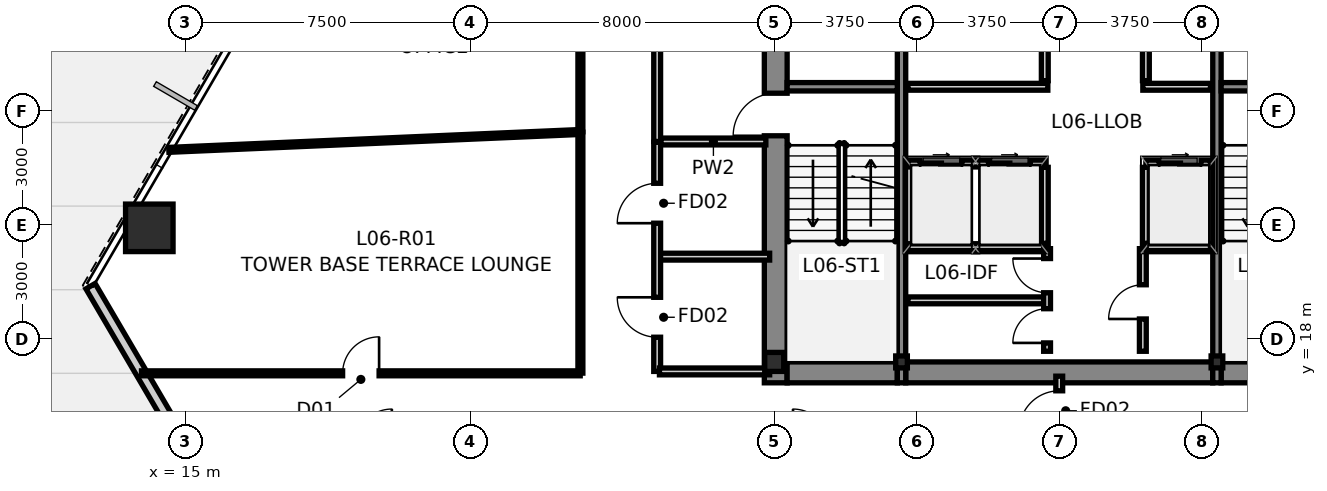
"""IFC4 building model, lengths in metres.
Left out: names, types, materials, properties, quantities, classifications, styles, units other than length and angle.
Written with IfcOpenShell. Run it as: python <this file> out.ifc"""

import sys

from ifc_helpers import new_model, si_unit, direction, frame, frame_2d, origin, origin_2d, place, context, subcontext, project, spatial, rectangle, hollow_rectangle, i_section, extrude, source, transform, mapped, element, fill, save


model = new_model("IFC4")
c1 = context("Model", 3, precision=1e-05, world=origin(), true_north=direction((0.0, 1.0)))
c2 = subcontext(c1, "Body", "Model", "MODEL_VIEW")
j1 = project(units=[si_unit("LENGTHUNIT", "METRE"), si_unit("PLANEANGLEUNIT", "RADIAN")], contexts=[c1])
p1 = place(None, origin())
s1 = spatial("IfcSite", under=j1, at=p1, CompositionType="ELEMENT")
p2 = place(p1, origin())
s2 = spatial("IfcBuilding", under=s1, at=p2, CompositionType="ELEMENT")
p3 = place(p2, frame((0.0, 0.0, 27.6)))
s3 = spatial("IfcBuildingStorey", under=s2, at=p3, CompositionType="ELEMENT", Elevation=27.6)
m1 = source(origin(), c2, "Body", "SweptSolid", [
    extrude(i_section(OverallWidth=0.5, OverallDepth=0.5, WebThickness=0.028, FlangeThickness=0.04, at=origin_2d()), origin(), (0.0, 0.0, 1.0), 3.65),
])
p4 = place(p3, frame((30.5, 17.4, 0.0), z_axis=(0.0, 0.0, 1.0), x_axis=(1.0, 0.0, 0.0)))
e1 = element("IfcColumn", 1, at=p4, inside=s3, PredefinedType="COLUMN", context=c2, shape_type="MappedRepresentation", body=[
    mapped(m1, transform((0.0, 0.0, 0.0), scale=1.0)),
])
m2 = source(origin(), c2, "Body", "SweptSolid", [
    extrude(i_section(OverallWidth=0.307, OverallDepth=0.315, WebThickness=0.012, FlangeThickness=0.019, at=origin_2d()), origin(), (0.0, 0.0, 1.0), 3.65),
])
for number, where, z_axis, x_axis in (
    (2, (33.85, 17.4, 0.0), (0.0, 0.0, 1.0), (1.0, 0.0, 0.0)),
    (3, (42.15, 17.4, 0.0), (0.0, 0.0, 1.0), (1.0, 0.0, 0.0)),
):
    element("IfcColumn", number, at=place(p3, frame(where, z_axis=z_axis, x_axis=x_axis)), inside=s3, PredefinedType="COLUMN", context=c2, shape_type="MappedRepresentation", body=[
        mapped(m2, transform((0.0, 0.0, 0.0), scale=1.0)),
    ])
p5 = place(p3, frame((30.54, 16.85, 0.0), z_axis=(0.0, 0.0, 1.0), x_axis=(0.0, 1.0, 0.0)))
e4 = element("IfcWall", 4, at=p5, inside=s3, PredefinedType="SHEAR", context=c2, shape_type="SweptSolid", body=[
    extrude(rectangle(XDim=13.425, YDim=0.6, at=frame_2d((6.712, 0.0))), origin(), (0.0, 0.0, 1.0), 3.65),
])
p6 = place(p5, frame((6.5, 0.0, 0.0)))
e5 = element("IfcOpeningElement", 5, at=p6, cuts=e4, PredefinedType="OPENING", context=c2, shape_type="SweptSolid", body=[
    extrude(rectangle(XDim=1.12, YDim=2.15, at=frame_2d((0.56, 1.075))), frame((0.0, 0.312, 0.0), z_axis=(0.0, -1.0, 0.0), x_axis=(1.0, 0.0, 0.0)), (0.0, 0.0, 1.0), 0.624),
])
p7 = place(p5, frame((10.95, 0.0, 0.0)))
e6 = element("IfcOpeningElement", 6, at=p7, cuts=e4, PredefinedType="OPENING", context=c2, shape_type="SweptSolid", body=[
    extrude(rectangle(XDim=1.2, YDim=2.2, at=frame_2d((0.6, 1.1))), frame((0.0, 0.312, 0.0), z_axis=(0.0, -1.0, 0.0), x_axis=(1.0, 0.0, 0.0)), (0.0, 0.0, 1.0), 0.624),
])
p8 = place(p3, frame((30.84, 17.125, 0.0), z_axis=(0.0, 0.0, 1.0), x_axis=(1.0, 0.0, 0.0)))
e7 = element("IfcWall", 7, at=p8, inside=s3, PredefinedType="SHEAR", context=c2, shape_type="SweptSolid", body=[
    extrude(rectangle(XDim=2.9, YDim=0.55, at=frame_2d((1.45, 0.0))), origin(), (0.0, 0.0, 1.0), 3.65),
])
p9 = place(p3, frame((33.96, 17.125, 0.0), z_axis=(0.0, 0.0, 1.0), x_axis=(1.0, 0.0, 0.0)))
e8 = element("IfcWall", 8, at=p9, inside=s3, PredefinedType="SHEAR", context=c2, shape_type="SweptSolid", body=[
    extrude(rectangle(XDim=8.08, YDim=0.55, at=frame_2d((4.04, 0.0))), origin(), (0.0, 0.0, 1.0), 3.65),
])
p10 = place(p3, frame((42.26, 17.125, 0.0), z_axis=(0.0, 0.0, 1.0), x_axis=(1.0, 0.0, 0.0)))
e9 = element("IfcWall", 9, at=p10, inside=s3, PredefinedType="SHEAR", context=c2, shape_type="SweptSolid", body=[
    extrude(rectangle(XDim=2.9, YDim=0.55, at=frame_2d((1.45, 0.0))), origin(), (0.0, 0.0, 1.0), 3.65),
])
for number, where, z_axis, x_axis in (
    (10, (33.85, 16.85, 0.0), (0.0, 0.0, 1.0), (0.0, 1.0, 0.0)),
    (11, (42.15, 16.85, 0.0), (0.0, 0.0, 1.0), (0.0, 1.0, 0.0)),
):
    element("IfcWall", number, at=place(p3, frame(where, z_axis=z_axis, x_axis=x_axis)), inside=s3, PredefinedType="SHEAR", context=c2, shape_type="SweptSolid", body=[
        extrude(rectangle(XDim=13.425, YDim=0.22, at=frame_2d((6.712, 0.0))), origin(), (0.0, 0.0, 1.0), 3.65),
    ])
for number, where, z_axis, x_axis in (
    (12, (30.84, 24.64, 0.0), (0.0, 0.0, 1.0), (1.0, 0.0, 0.0)),
    (13, (42.26, 24.64, 0.0), (0.0, 0.0, 1.0), (1.0, 0.0, 0.0)),
):
    element("IfcWall", number, at=place(p3, frame(where, z_axis=z_axis, x_axis=x_axis)), inside=s3, PredefinedType="SHEAR", context=c2, shape_type="SweptSolid", body=[
        extrude(rectangle(XDim=2.9, YDim=0.22, at=frame_2d((1.45, 0.0))), origin(), (0.0, 0.0, 1.0), 3.65),
    ])
m3 = source(origin(), c2, "Body", "SweptSolid", [
    extrude(hollow_rectangle(XDim=1.25, YDim=1.25, WallThickness=0.07, at=origin_2d()), origin(), (0.0, 0.0, 1.0), 3.651),
])
p11 = place(p3, frame((14.056, 20.928, 0.0), z_axis=(0.010431795422, -0.021532295679, 0.999713727968), x_axis=(0.899947055326, 0.435999194506, 0.0)))
e14 = element("IfcColumn", 14, at=p11, inside=s3, PredefinedType="COLUMN", context=c2, shape_type="MappedRepresentation", body=[
    mapped(m3, transform((0.0, 0.0, 0.0), scale=1.0)),
])
p12 = place(p3, frame((21.466, 4.107, 0.0), z_axis=(0.0, 0.0, 1.0), x_axis=(-0.505539127034, 0.862803680473, 0.0)))
e15 = element("IfcWall", 15, at=p12, inside=s3, PredefinedType="STANDARD", context=c2, shape_type="SweptSolid", body=[
    extrude(rectangle(XDim=17.717, YDim=0.28, at=frame_2d((8.858, 0.0))), origin(), (0.0, 0.0, 1.0), 3.4),
])
p13 = place(p12, frame((7.96, 0.0, 0.9)))
e16 = element("IfcOpeningElement", 16, at=p13, cuts=e15, PredefinedType="OPENING", context=c2, shape_type="SweptSolid", body=[
    extrude(rectangle(XDim=1.8, YDim=1.8, at=frame_2d((0.9, 0.9))), frame((0.0, 0.152, 0.0), z_axis=(0.0, -1.0, 0.0), x_axis=(1.0, 0.0, 0.0)), (0.0, 0.0, 1.0), 0.304),
])
p14 = place(p3, frame((34.02, 22.62, 0.0), z_axis=(0.0, 0.0, 1.0), x_axis=(1.0, 0.0, 0.0)))
e17 = element("IfcWall", 17, at=p14, inside=s3, PredefinedType="PARTITIONING", context=c2, shape_type="SweptSolid", body=[
    extrude(rectangle(XDim=3.6, YDim=0.18, at=frame_2d((1.8, 0.0))), origin(), (0.0, 0.0, 1.0), 3.4),
])
p15 = place(p14, frame((0.32, 0.0, 0.0)))
e18 = element("IfcOpeningElement", 18, at=p15, cuts=e17, PredefinedType="OPENING", context=c2, shape_type="SweptSolid", body=[
    extrude(rectangle(XDim=1.1, YDim=2.2, at=frame_2d((0.55, 1.1))), frame((0.0, 0.102, 0.0), z_axis=(0.0, -1.0, 0.0), x_axis=(1.0, 0.0, 0.0)), (0.0, 0.0, 1.0), 0.204),
])
p16 = place(p14, frame((2.12, 0.0, 0.0)))
e19 = element("IfcOpeningElement", 19, at=p16, cuts=e17, PredefinedType="OPENING", context=c2, shape_type="SweptSolid", body=[
    extrude(rectangle(XDim=1.1, YDim=2.2, at=frame_2d((0.55, 1.1))), frame((0.0, 0.102, 0.0), z_axis=(0.0, -1.0, 0.0), x_axis=(1.0, 0.0, 0.0)), (0.0, 0.0, 1.0), 0.204),
])
p17 = place(p3, frame((40.28, 22.62, 0.0), z_axis=(0.0, 0.0, 1.0), x_axis=(1.0, 0.0, 0.0)))
e20 = element("IfcWall", 20, at=p17, inside=s3, PredefinedType="PARTITIONING", context=c2, shape_type="SweptSolid", body=[
    extrude(rectangle(XDim=1.7, YDim=0.18, at=frame_2d((0.85, 0.0))), origin(), (0.0, 0.0, 1.0), 3.4),
])
p18 = place(p17, frame((0.35, 0.0, 0.0)))
e21 = element("IfcOpeningElement", 21, at=p18, cuts=e20, PredefinedType="OPENING", context=c2, shape_type="SweptSolid", body=[
    extrude(rectangle(XDim=1.1, YDim=2.2, at=frame_2d((0.55, 1.1))), frame((0.0, 0.102, 0.0), z_axis=(0.0, -1.0, 0.0), x_axis=(1.0, 0.0, 0.0)), (0.0, 0.0, 1.0), 0.204),
])
for number, where, z_axis, x_axis in (
    (22, (37.62, 20.52, 0.0), (0.0, 0.0, 1.0), (0.0, 1.0, 0.0)),
    (23, (40.28, 20.52, 0.0), (0.0, 0.0, 1.0), (0.0, 1.0, 0.0)),
    (24, (37.62, 24.8, 0.0), (0.0, 0.0, 1.0), (0.0, 1.0, 0.0)),
    (25, (40.28, 24.8, 0.0), (0.0, 0.0, 1.0), (0.0, 1.0, 0.0)),
):
    element("IfcWall", number, at=place(p3, frame(where, z_axis=z_axis, x_axis=x_axis)), inside=s3, PredefinedType="PARTITIONING", context=c2, shape_type="SweptSolid", body=[
        extrude(rectangle(XDim=2.0, YDim=0.18, at=frame_2d((1.0, 0.0))), origin(), (0.0, 0.0, 1.0), 3.4),
    ])
p19 = place(p3, frame((34.02, 24.64, 0.0), z_axis=(0.0, 0.0, 1.0), x_axis=(1.0, 0.0, 0.0)))
e26 = element("IfcWall", 26, at=p19, inside=s3, PredefinedType="PARTITIONING", context=c2, shape_type="SweptSolid", body=[
    extrude(rectangle(XDim=3.68, YDim=0.18, at=frame_2d((1.84, 0.0))), origin(), (0.0, 0.0, 1.0), 3.4),
])
p20 = place(p3, frame((40.2, 24.64, 0.0), z_axis=(0.0, 0.0, 1.0), x_axis=(1.0, 0.0, 0.0)))
e27 = element("IfcWall", 27, at=p20, inside=s3, PredefinedType="PARTITIONING", context=c2, shape_type="SweptSolid", body=[
    extrude(rectangle(XDim=1.78, YDim=0.18, at=frame_2d((0.89, 0.0))), origin(), (0.0, 0.0, 1.0), 3.4),
])
p21 = place(p3, frame((27.42, 23.2, 0.0), z_axis=(0.0, 0.0, 1.0), x_axis=(0.0, 1.0, 0.0)))
e28 = element("IfcWall", 28, at=p21, inside=s3, PredefinedType="PARTITIONING", context=c2, shape_type="SweptSolid", body=[
    extrude(rectangle(XDim=6.4, YDim=0.18, at=frame_2d((3.2, 0.0))), origin(), (0.0, 0.0, 1.0), 3.4),
])
p22 = place(p21, frame((2.65, 0.0, 0.0)))
e29 = element("IfcOpeningElement", 29, at=p22, cuts=e28, PredefinedType="OPENING", context=c2, shape_type="SweptSolid", body=[
    extrude(rectangle(XDim=1.05, YDim=2.15, at=frame_2d((0.525, 1.075))), frame((0.0, 0.102, 0.0), z_axis=(0.0, -1.0, 0.0), x_axis=(1.0, 0.0, 0.0)), (0.0, 0.0, 1.0), 0.204),
])
p23 = place(p3, frame((27.52, 23.2, 0.0), z_axis=(0.0, 0.0, 1.0), x_axis=(1.0, 0.0, 0.0)))
e30 = element("IfcWall", 30, at=p23, inside=s3, PredefinedType="PARTITIONING", context=c2, shape_type="SweptSolid", body=[
    extrude(rectangle(XDim=2.76, YDim=0.18, at=frame_2d((1.38, 0.0))), origin(), (0.0, 0.0, 1.0), 3.4),
])
p24 = place(p3, frame((34.02, 20.42, 0.0), z_axis=(0.0, 0.0, 1.0), x_axis=(1.0, 0.0, 0.0)))
e31 = element("IfcWall", 31, at=p24, inside=s3, PredefinedType="PARTITIONING", context=c2, shape_type="SweptSolid", body=[
    extrude(rectangle(XDim=3.64, YDim=0.18, at=frame_2d((1.82, 0.0))), origin(), (0.0, 0.0, 1.0), 3.4),
])
p25 = place(p3, frame((40.22, 20.42, 0.0), z_axis=(0.0, 0.0, 1.0), x_axis=(1.0, 0.0, 0.0)))
e32 = element("IfcWall", 32, at=p25, inside=s3, PredefinedType="PARTITIONING", context=c2, shape_type="SweptSolid", body=[
    extrude(rectangle(XDim=1.76, YDim=0.18, at=frame_2d((0.88, 0.0))), origin(), (0.0, 0.0, 1.0), 3.4),
])
p26 = place(p3, frame((34.02, 19.02, 0.0), z_axis=(0.0, 0.0, 1.0), x_axis=(1.0, 0.0, 0.0)))
e33 = element("IfcWall", 33, at=p26, inside=s3, PredefinedType="PARTITIONING", context=c2, shape_type="SweptSolid", body=[
    extrude(rectangle(XDim=3.58, YDim=0.18, at=frame_2d((1.79, 0.0))), origin(), (0.0, 0.0, 1.0), 3.4),
])
p27 = place(p3, frame((37.68, 17.68, 0.0), z_axis=(0.0, 0.0, 1.0), x_axis=(0.0, 1.0, 0.0)))
e34 = element("IfcWall", 34, at=p27, inside=s3, PredefinedType="PARTITIONING", context=c2, shape_type="SweptSolid", body=[
    extrude(rectangle(XDim=2.7, YDim=0.18, at=frame_2d((1.35, 0.0))), origin(), (0.0, 0.0, 1.0), 3.4),
])
p28 = place(p27, frame((0.22, 0.0, 0.0)))
e35 = element("IfcOpeningElement", 35, at=p28, cuts=e34, PredefinedType="OPENING", context=c2, shape_type="SweptSolid", body=[
    extrude(rectangle(XDim=0.9, YDim=2.1, at=frame_2d((0.45, 1.05))), frame((0.0, 0.102, 0.0), z_axis=(0.0, -1.0, 0.0), x_axis=(1.0, 0.0, 0.0)), (0.0, 0.0, 1.0), 0.204),
])
p29 = place(p27, frame((1.54, 0.0, 0.0)))
e36 = element("IfcOpeningElement", 36, at=p29, cuts=e34, PredefinedType="OPENING", context=c2, shape_type="SweptSolid", body=[
    extrude(rectangle(XDim=0.9, YDim=2.1, at=frame_2d((0.45, 1.05))), frame((0.0, 0.102, 0.0), z_axis=(0.0, -1.0, 0.0), x_axis=(1.0, 0.0, 0.0)), (0.0, 0.0, 1.0), 0.204),
])
p30 = place(p3, frame((40.2, 17.68, 0.0), z_axis=(0.0, 0.0, 1.0), x_axis=(0.0, 1.0, 0.0)))
e37 = element("IfcWall", 37, at=p30, inside=s3, PredefinedType="PARTITIONING", context=c2, shape_type="SweptSolid", body=[
    extrude(rectangle(XDim=2.7, YDim=0.18, at=frame_2d((1.35, 0.0))), origin(), (0.0, 0.0, 1.0), 3.4),
])
p31 = place(p30, frame((0.85, 0.0, 0.0)))
e38 = element("IfcOpeningElement", 38, at=p31, cuts=e37, PredefinedType="OPENING", context=c2, shape_type="SweptSolid", body=[
    extrude(rectangle(XDim=0.9, YDim=2.1, at=frame_2d((0.45, 1.05))), frame((0.0, 0.102, 0.0), z_axis=(0.0, -1.0, 0.0), x_axis=(1.0, 0.0, 0.0)), (0.0, 0.0, 1.0), 0.204),
])
p32 = place(p3, frame((27.48, 20.17, 0.0), z_axis=(0.0, 0.0, 1.0), x_axis=(1.0, 0.0, 0.0)))
e39 = element("IfcWall", 39, at=p32, inside=s3, PredefinedType="PARTITIONING", context=c2, shape_type="SweptSolid", body=[
    extrude(rectangle(XDim=2.9, YDim=0.18, at=frame_2d((1.45, 0.0))), origin(), (0.0, 0.0, 1.0), 3.4),
])
p33 = place(p3, frame((27.42, 17.15, 0.0), z_axis=(0.0, 0.0, 1.0), x_axis=(0.0, 1.0, 0.0)))
e40 = element("IfcWall", 40, at=p33, inside=s3, PredefinedType="PARTITIONING", context=c2, shape_type="SweptSolid", body=[
    extrude(rectangle(XDim=6.03, YDim=0.18, at=frame_2d((3.015, 0.0))), origin(), (0.0, 0.0, 1.0), 3.026),
])
p34 = place(p33, frame((0.9, 0.0, 0.0)))
e41 = element("IfcOpeningElement", 41, at=p34, cuts=e40, PredefinedType="OPENING", context=c2, shape_type="SweptSolid", body=[
    extrude(rectangle(XDim=1.05, YDim=2.15, at=frame_2d((0.525, 1.075))), frame((0.0, 0.102, 0.0), z_axis=(0.0, -1.0, 0.0), x_axis=(1.0, 0.0, 0.0)), (0.0, 0.0, 1.0), 0.204),
])
p35 = place(p33, frame((3.9, 0.0, 0.0)))
e42 = element("IfcOpeningElement", 42, at=p35, cuts=e40, PredefinedType="OPENING", context=c2, shape_type="SweptSolid", body=[
    extrude(rectangle(XDim=1.05, YDim=2.15, at=frame_2d((0.525, 1.075))), frame((0.0, 0.102, 0.0), z_axis=(0.0, -1.0, 0.0), x_axis=(1.0, 0.0, 0.0)), (0.0, 0.0, 1.0), 0.204),
])
p36 = place(p3, frame((27.48, 17.15, 0.0), z_axis=(0.0, 0.0, 1.0), x_axis=(1.0, 0.0, 0.0)))
e43 = element("IfcWall", 43, at=p36, inside=s3, PredefinedType="PARTITIONING", context=c2, shape_type="SweptSolid", body=[
    extrude(rectangle(XDim=2.9, YDim=0.18, at=frame_2d((1.45, 0.0))), origin(), (0.0, 0.0, 1.0), 2.783),
])
p37 = place(p3, frame((13.85, 17.1, 0.0), z_axis=(0.0, 0.0, 1.0), x_axis=(1.0, 0.0, 0.0)))
e44 = element("IfcWall", 44, at=p37, inside=s3, PredefinedType="PARTITIONING", context=c2, shape_type="SweptSolid", body=[
    extrude(rectangle(XDim=11.545, YDim=0.13, at=frame_2d((5.772, 0.0))), origin(), (0.0, 0.0, 1.0), 3.4),
])
p38 = place(p37, frame((5.293, 0.0, 0.0)))
e45 = element("IfcOpeningElement", 45, at=p38, cuts=e44, PredefinedType="OPENING", context=c2, shape_type="SweptSolid", body=[
    extrude(rectangle(XDim=0.96, YDim=2.15, at=frame_2d((0.48, 1.075))), frame((0.0, 0.077, 0.0), z_axis=(0.0, -1.0, 0.0), x_axis=(1.0, 0.0, 0.0)), (0.0, 0.0, 1.0), 0.154),
])
p39 = place(p3, frame((14.57, 22.98, 0.0), z_axis=(0.0, 0.0, 1.0), x_axis=(0.999058877274, 0.043374643965, 0.0)))
e46 = element("IfcWall", 46, at=p39, inside=s3, PredefinedType="PARTITIONING", context=c2, shape_type="SweptSolid", body=[
    extrude(rectangle(XDim=10.835, YDim=0.13, at=frame_2d((5.417, 0.0))), origin(), (0.0, 0.0, 1.0), 3.4),
])
p40 = place(p3, frame((25.4, 23.455, 0.0), z_axis=(0.0, 0.0, 1.0), x_axis=(0.0, 1.0, 0.0)))
e47 = element("IfcWall", 47, at=p40, inside=s3, PredefinedType="PARTITIONING", context=c2, shape_type="SweptSolid", body=[
    extrude(rectangle(XDim=6.64, YDim=0.13, at=frame_2d((3.32, 0.0))), origin(), (0.0, 0.0, 1.0), 3.026),
])
p41 = place(p3, frame((25.4, 17.105, 0.0), z_axis=(0.0, 0.0, 1.0), x_axis=(0.0, 1.0, 0.0)))
e48 = element("IfcWall", 48, at=p41, inside=s3, PredefinedType="PARTITIONING", context=c2, shape_type="SweptSolid", body=[
    extrude(rectangle(XDim=6.34, YDim=0.13, at=frame_2d((3.17, 0.0))), origin(), (0.0, 0.0, 1.0), 3.026),
])
p42 = place(p3, frame((38.0, 15.205, 0.0), z_axis=(0.0, 0.0, 1.0), x_axis=(0.0, 1.0, 0.0)))
e49 = element("IfcWall", 49, at=p42, inside=s3, PredefinedType="PARTITIONING", context=c2, shape_type="SweptSolid", body=[
    extrude(rectangle(XDim=1.82, YDim=0.18, at=frame_2d((0.91, 0.0))), origin(), (0.0, 0.0, 1.0), 3.4),
])
p43 = place(p42, frame((0.385, 0.0, 0.0)))
e50 = element("IfcOpeningElement", 50, at=p43, cuts=e49, PredefinedType="OPENING", context=c2, shape_type="SweptSolid", body=[
    extrude(rectangle(XDim=1.05, YDim=2.15, at=frame_2d((0.525, 1.075))), frame((0.0, 0.102, 0.0), z_axis=(0.0, -1.0, 0.0), x_axis=(1.0, 0.0, 0.0)), (0.0, 0.0, 1.0), 0.204),
])
p44 = place(p6, origin())
e51 = element("IfcDoor", 51, at=p44, inside=s3, OperationType="SINGLE_SWING_LEFT", PredefinedType="DOOR", context=c2, shape_type="SweptSolid", body=[
    extrude(rectangle(XDim=1.12, YDim=2.15, at=frame_2d((0.56, 1.075))), frame((0.0, 0.025, 0.0), z_axis=(0.0, -1.0, 0.0), x_axis=(1.0, 0.0, 0.0)), (0.0, 0.0, 1.0), 0.05),
])
fill(e5, e51)
p45 = place(p15, origin())
e52 = element("IfcDoor", 52, at=p45, inside=s3, OperationType="SLIDING_TO_LEFT", PredefinedType="DOOR", context=c2, shape_type="SweptSolid", body=[
    extrude(rectangle(XDim=1.1, YDim=2.2, at=frame_2d((0.55, 1.1))), frame((0.0, 0.025, 0.0), z_axis=(0.0, -1.0, 0.0), x_axis=(1.0, 0.0, 0.0)), (0.0, 0.0, 1.0), 0.05),
])
fill(e18, e52)
p46 = place(p16, origin())
e53 = element("IfcDoor", 53, at=p46, inside=s3, OperationType="SLIDING_TO_RIGHT", PredefinedType="DOOR", context=c2, shape_type="SweptSolid", body=[
    extrude(rectangle(XDim=1.1, YDim=2.2, at=frame_2d((0.55, 1.1))), frame((0.0, 0.025, 0.0), z_axis=(0.0, -1.0, 0.0), x_axis=(1.0, 0.0, 0.0)), (0.0, 0.0, 1.0), 0.05),
])
fill(e19, e53)
p47 = place(p18, origin())
e54 = element("IfcDoor", 54, at=p47, inside=s3, OperationType="SLIDING_TO_LEFT", PredefinedType="DOOR", context=c2, shape_type="SweptSolid", body=[
    extrude(rectangle(XDim=1.1, YDim=2.2, at=frame_2d((0.55, 1.1))), frame((0.0, 0.025, 0.0), z_axis=(0.0, -1.0, 0.0), x_axis=(1.0, 0.0, 0.0)), (0.0, 0.0, 1.0), 0.05),
])
fill(e21, e54)
p48 = place(p28, origin())
e55 = element("IfcDoor", 55, at=p48, inside=s3, OperationType="SINGLE_SWING_LEFT", PredefinedType="DOOR", context=c2, shape_type="SweptSolid", body=[
    extrude(rectangle(XDim=0.9, YDim=2.1, at=frame_2d((0.45, 1.05))), frame((0.0, 0.025, 0.0), z_axis=(0.0, -1.0, 0.0), x_axis=(1.0, 0.0, 0.0)), (0.0, 0.0, 1.0), 0.05),
])
fill(e35, e55)
p49 = place(p29, origin())
e56 = element("IfcDoor", 56, at=p49, inside=s3, OperationType="SINGLE_SWING_RIGHT", PredefinedType="DOOR", context=c2, shape_type="SweptSolid", body=[
    extrude(rectangle(XDim=0.9, YDim=2.1, at=frame_2d((0.45, 1.05))), frame((0.0, 0.025, 0.0), z_axis=(0.0, -1.0, 0.0), x_axis=(1.0, 0.0, 0.0)), (0.0, 0.0, 1.0), 0.05),
])
fill(e36, e56)
p50 = place(p31, origin())
e57 = element("IfcDoor", 57, at=p50, inside=s3, OperationType="SINGLE_SWING_LEFT", PredefinedType="DOOR", context=c2, shape_type="SweptSolid", body=[
    extrude(rectangle(XDim=0.9, YDim=2.1, at=frame_2d((0.45, 1.05))), frame((0.0, 0.025, 0.0), z_axis=(0.0, -1.0, 0.0), x_axis=(1.0, 0.0, 0.0)), (0.0, 0.0, 1.0), 0.05),
])
fill(e38, e57)
p51 = place(p34, origin())
e58 = element("IfcDoor", 58, at=p51, inside=s3, OperationType="SINGLE_SWING_RIGHT", PredefinedType="DOOR", context=c2, shape_type="SweptSolid", body=[
    extrude(rectangle(XDim=1.05, YDim=2.15, at=frame_2d((0.525, 1.075))), frame((0.0, 0.025, 0.0), z_axis=(0.0, -1.0, 0.0), x_axis=(1.0, 0.0, 0.0)), (0.0, 0.0, 1.0), 0.05),
])
fill(e41, e58)
p52 = place(p35, origin())
e59 = element("IfcDoor", 59, at=p52, inside=s3, OperationType="SINGLE_SWING_LEFT", PredefinedType="DOOR", context=c2, shape_type="SweptSolid", body=[
    extrude(rectangle(XDim=1.05, YDim=2.15, at=frame_2d((0.525, 1.075))), frame((0.0, 0.025, 0.0), z_axis=(0.0, -1.0, 0.0), x_axis=(1.0, 0.0, 0.0)), (0.0, 0.0, 1.0), 0.05),
])
fill(e42, e59)
p53 = place(p38, origin())
e60 = element("IfcDoor", 60, at=p53, inside=s3, OperationType="SINGLE_SWING_RIGHT", PredefinedType="DOOR", context=c2, shape_type="SweptSolid", body=[
    extrude(rectangle(XDim=0.96, YDim=2.15, at=frame_2d((0.48, 1.075))), frame((0.0, 0.025, 0.0), z_axis=(0.0, -1.0, 0.0), x_axis=(1.0, 0.0, 0.0)), (0.0, 0.0, 1.0), 0.05),
])
fill(e45, e60)
p54 = place(p43, origin())
e61 = element("IfcDoor", 61, at=p54, inside=s3, OperationType="SINGLE_SWING_LEFT", PredefinedType="DOOR", context=c2, shape_type="SweptSolid", body=[
    extrude(rectangle(XDim=1.05, YDim=2.15, at=frame_2d((0.525, 1.075))), frame((0.0, 0.025, 0.0), z_axis=(0.0, -1.0, 0.0), x_axis=(1.0, 0.0, 0.0)), (0.0, 0.0, 1.0), 0.05),
])
fill(e50, e61)
save(model, sys.argv[1])
